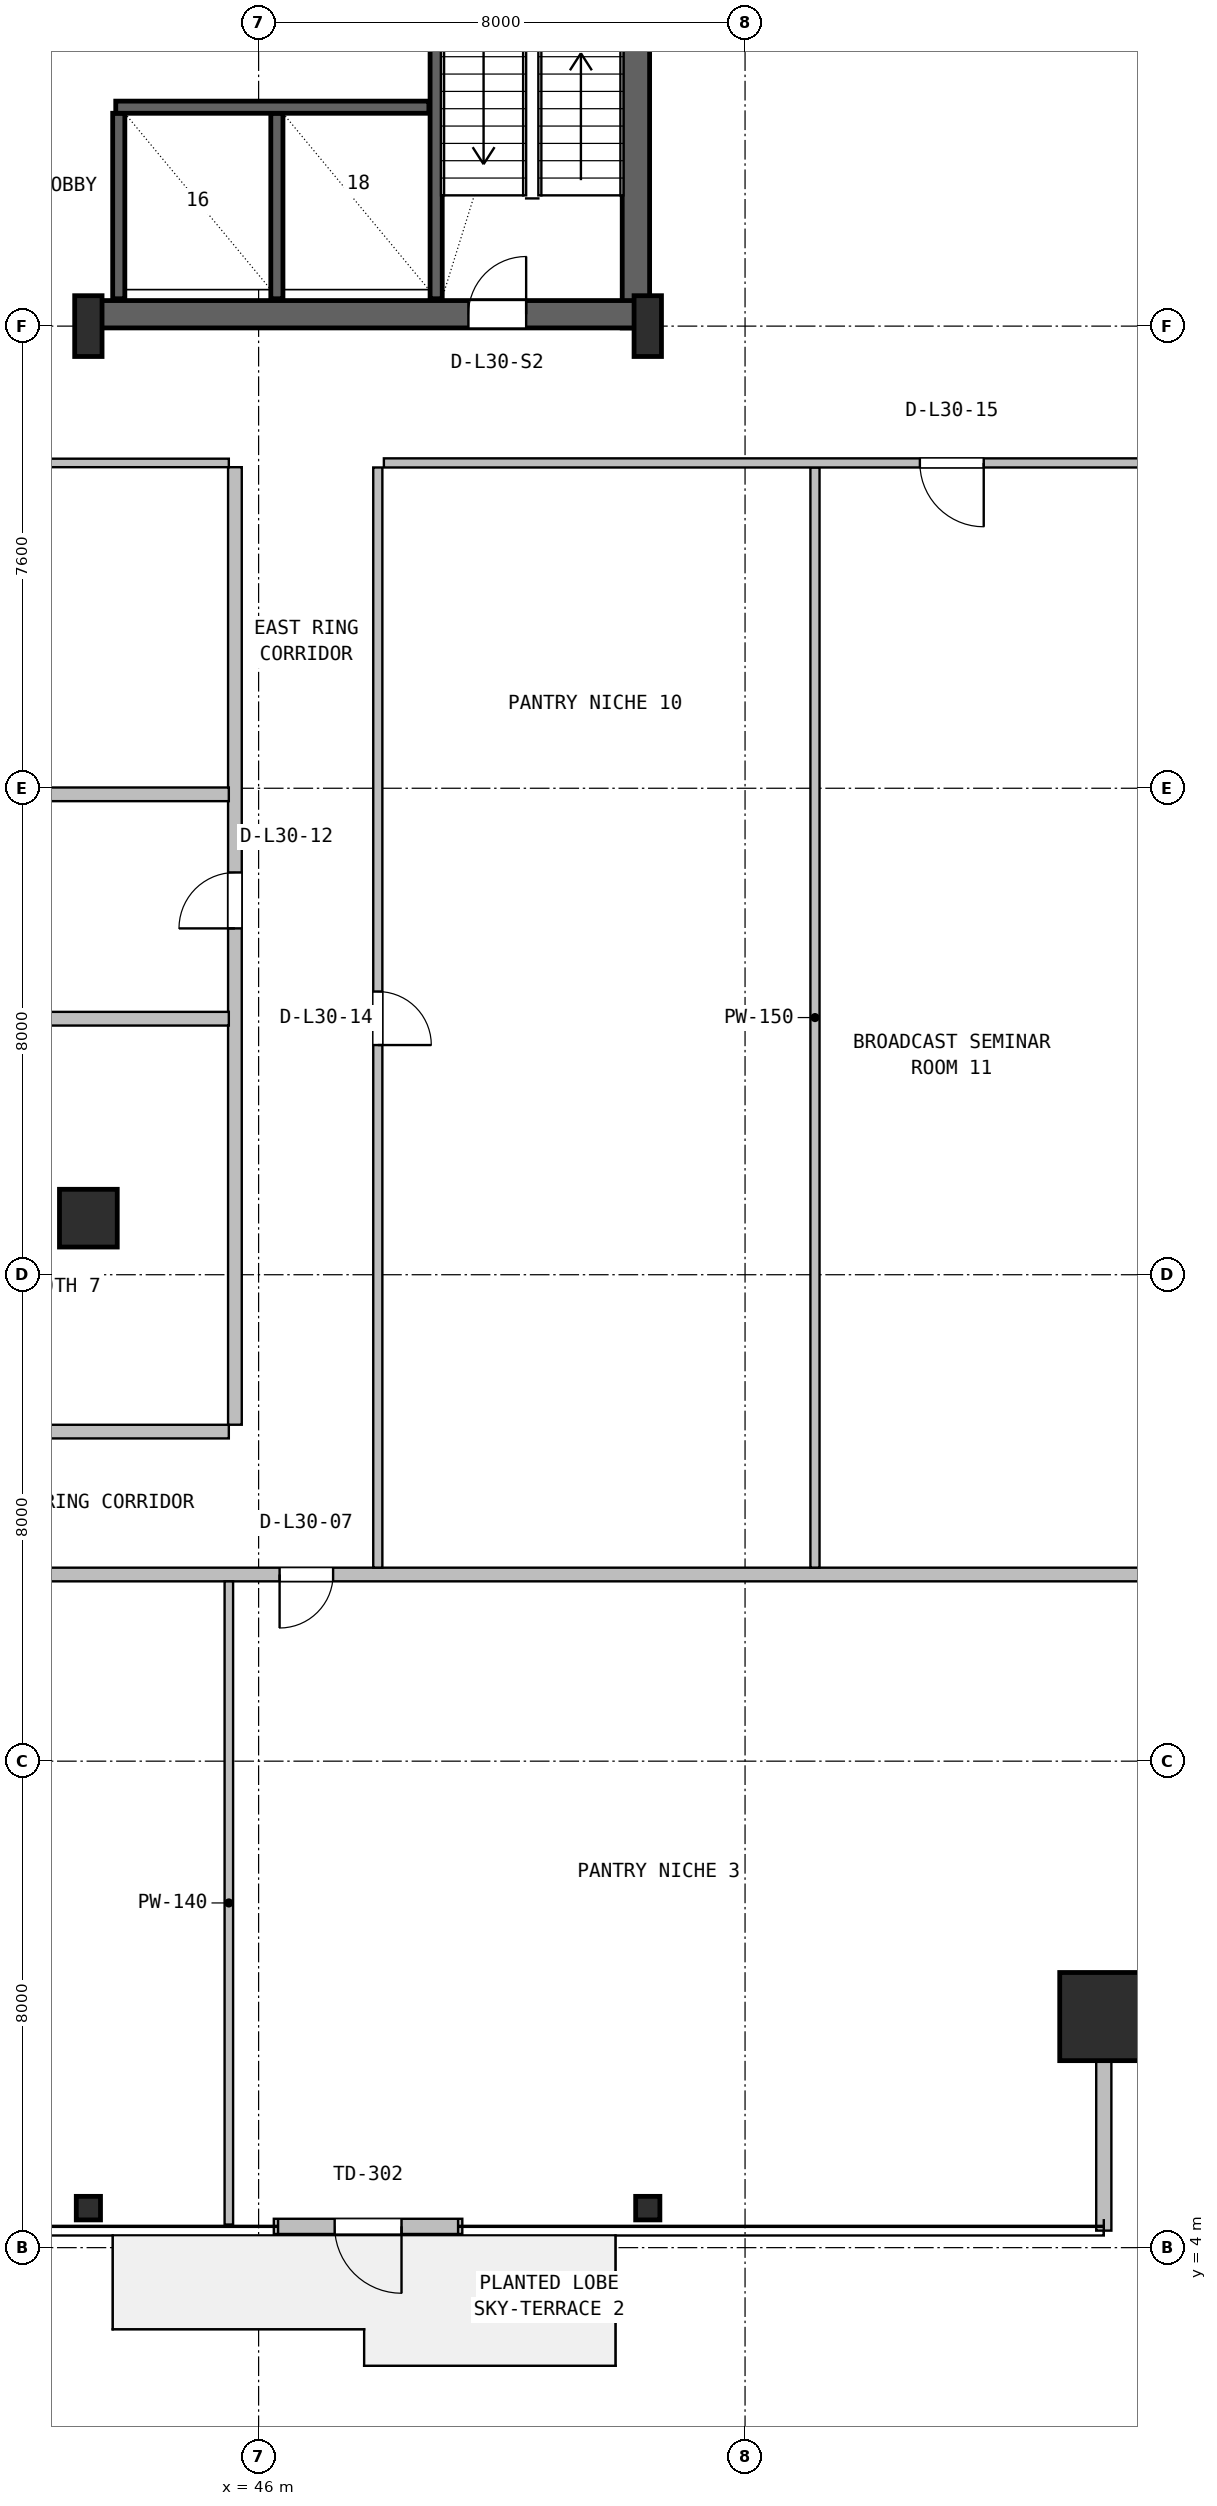
"""IFC4 building model, lengths in metres.
Left out: names, types, materials, properties, quantities, classifications, styles, units other than length and angle.
Written with IfcOpenShell. Run it as: python <this file> out.ifc"""

import sys

from ifc_helpers import new_model, si_unit, direction, frame, frame_2d, origin, origin_2d, place, context, subcontext, project, spatial, rectangle, hollow_rectangle, i_section, extrude, source, transform, mapped, element, fill, save


model = new_model("IFC4")
c1 = context("Model", 3, precision=1e-05, world=origin(), true_north=direction((0.0, 1.0)))
c2 = subcontext(c1, "Body", "Model", "MODEL_VIEW")
j1 = project(units=[si_unit("LENGTHUNIT", "METRE"), si_unit("PLANEANGLEUNIT", "RADIAN")], contexts=[c1])
p1 = place(None, origin())
s1 = spatial("IfcSite", under=j1, at=p1, CompositionType="ELEMENT")
p2 = place(p1, origin())
s2 = spatial("IfcBuilding", under=s1, at=p2, CompositionType="ELEMENT")
p3 = place(p2, frame((0.0, 0.0, 125.8)))
s3 = spatial("IfcBuildingStorey", under=s2, at=p3, CompositionType="ELEMENT", Elevation=125.8)
p4 = place(p3, frame((52.205, 35.57, 0.0), z_axis=(0.0, 0.0, 1.0), x_axis=(0.0, 1.0, 0.0)))
e1 = element("IfcWall", 1, at=p4, inside=s3, PredefinedType="SHEAR", context=c2, shape_type="SweptSolid", body=[
    extrude(rectangle(XDim=11.23, YDim=0.45, at=frame_2d((5.615, 0.0))), origin(), (0.0, 0.0, 1.0), 3.55),
])
p5 = place(p3, frame((43.2, 35.795, 0.0), z_axis=(0.0, 0.0, 1.0), x_axis=(1.0, 0.0, 0.0)))
e2 = element("IfcWall", 2, at=p5, inside=s3, PredefinedType="SHEAR", context=c2, shape_type="SweptSolid", body=[
    extrude(rectangle(XDim=9.23, YDim=0.45, at=frame_2d((4.615, 0.0))), origin(), (0.0, 0.0, 1.0), 3.55),
])
p6 = place(p5, frame((6.25, 0.0, 0.0)))
e3 = element("IfcOpeningElement", 3, at=p6, cuts=e2, PredefinedType="OPENING", context=c2, shape_type="SweptSolid", body=[
    extrude(rectangle(XDim=0.95, YDim=2.1, at=frame_2d((0.475, 1.05))), frame((0.0, 0.235, 0.0), z_axis=(0.0, -1.0, 0.0), x_axis=(1.0, 0.0, 0.0)), (0.0, 0.0, 1.0), 0.47),
])
m1 = source(origin(), c2, "Body", "SweptSolid", [
    extrude(i_section(OverallWidth=0.45, OverallDepth=1.0, WebThickness=0.016, FlangeThickness=0.03, FilletRadius=0.016, at=origin_2d()), origin(), (0.0, 0.0, 1.0), 3.8),
])
for number, where, z_axis, x_axis in (
    (4, (43.2, 35.6, 0.0), (0.0, 0.0, 1.0), (1.0, 0.0, 0.0)),
    (5, (52.4, 35.6, 0.0), (0.0, 0.0, 1.0), (1.0, 0.0, 0.0)),
):
    element("IfcColumn", number, at=place(p3, frame(where, z_axis=z_axis, x_axis=x_axis)), inside=s3, PredefinedType="COLUMN", context=c2, shape_type="MappedRepresentation", body=[
        mapped(m1, transform((0.0, 0.0, 0.0), x_axis=(1.0, 0.0, 0.0), y_axis=(0.0, 1.0, 0.0), z_axis=(0.0, 0.0, 1.0), scale=1.0)),
    ])
m2 = source(origin(), c2, "Body", "SweptSolid", [
    extrude(hollow_rectangle(XDim=1.45, YDim=1.45, WallThickness=0.055, at=origin_2d()), origin(), (0.0, 0.0, 1.0), 3.8),
])
p7 = place(p3, frame((59.9, 7.8, 0.0), z_axis=(0.0, 0.0, 1.0), x_axis=(1.0, 0.0, 0.0)))
e6 = element("IfcColumn", 6, at=p7, inside=s3, PredefinedType="COLUMN", context=c2, shape_type="MappedRepresentation", body=[
    mapped(m2, transform((0.0, 0.0, 0.0), x_axis=(1.0, 0.0, 0.0), y_axis=(0.0, 1.0, 0.0), z_axis=(0.0, 0.0, 1.0), scale=1.0)),
])
m3 = source(origin(), c2, "Body", "SweptSolid", [
    extrude(i_section(OverallWidth=0.398, OverallDepth=0.387, WebThickness=0.021, FlangeThickness=0.033, FilletRadius=0.018, at=origin_2d()), origin(), (0.0, 0.0, 1.0), 3.8),
])
for number, where, z_axis, x_axis in (
    (7, (43.2, 4.65, 0.0), (0.0, 0.0, 1.0), (1.0, 0.0, 0.0)),
    (8, (52.4, 4.65, 0.0), (0.0, 0.0, 1.0), (1.0, 0.0, 0.0)),
):
    element("IfcColumn", number, at=place(p3, frame(where, z_axis=z_axis, x_axis=x_axis)), inside=s3, PredefinedType="COLUMN", context=c2, shape_type="MappedRepresentation", body=[
        mapped(m3, transform((0.0, 0.0, 0.0), x_axis=(1.0, 0.0, 0.0), y_axis=(0.0, 1.0, 0.0), z_axis=(0.0, 0.0, 1.0), scale=1.0)),
    ])
m4 = source(origin(), c2, "Body", "SweptSolid", [
    extrude(rectangle(XDim=0.95, YDim=0.95, at=origin_2d()), origin(), (0.0, 0.0, 1.0), 3.8),
])
p8 = place(p3, frame((43.2, 20.93, 0.0), z_axis=(0.0, 0.0, 1.0), x_axis=(1.0, 0.0, 0.0)))
e9 = element("IfcColumn", 9, at=p8, inside=s3, PredefinedType="COLUMN", context=c2, shape_type="MappedRepresentation", body=[
    mapped(m4, transform((0.0, 0.0, 0.0), x_axis=(1.0, 0.0, 0.0), y_axis=(0.0, 1.0, 0.0), z_axis=(0.0, 0.0, 1.0), scale=1.0)),
])
p9 = place(p3, frame((46.25, 4.35, 0.0), z_axis=(0.0, 0.0, 1.0), x_axis=(1.0, 0.0, 0.0)))
e10 = element("IfcWall", 10, at=p9, inside=s3, PredefinedType="SOLIDWALL", context=c2, shape_type="SweptSolid", body=[
    extrude(rectangle(XDim=3.1, YDim=0.25, at=frame_2d((1.55, 0.0))), origin(), (0.0, 0.0, 1.0), 3.53),
])
p10 = place(p9, frame((1.0, 0.0, 0.0)))
e11 = element("IfcOpeningElement", 11, at=p10, cuts=e10, PredefinedType="OPENING", context=c2, shape_type="SweptSolid", body=[
    extrude(rectangle(XDim=1.1, YDim=2.15, at=frame_2d((0.55, 1.075))), frame((0.0, 0.135, 0.0), z_axis=(0.0, -1.0, 0.0), x_axis=(1.0, 0.0, 0.0)), (0.0, 0.0, 1.0), 0.27),
])
p11 = place(p3, frame((59.9, 4.28, 0.0), z_axis=(0.0, 0.0, 1.0), x_axis=(0.0, 1.0, 0.0)))
e12 = element("IfcWall", 12, at=p11, inside=s3, PredefinedType="SOLIDWALL", context=c2, shape_type="SweptSolid", body=[
    extrude(rectangle(XDim=3.6, YDim=0.25, at=frame_2d((1.8, 0.0))), origin(), (0.0, 0.0, 1.0), 3.108),
])
p12 = place(p3, frame((48.92, 36.05, 0.0), z_axis=(0.0, 0.0, 1.0), x_axis=(0.0, 1.0, 0.0)))
e13 = element("IfcWall", 13, at=p12, inside=s3, PredefinedType="SHEAR", context=c2, shape_type="SweptSolid", body=[
    extrude(rectangle(XDim=10.5, YDim=0.2, at=frame_2d((5.25, 0.0))), origin(), (0.0, 0.0, 1.0), 3.55),
])
for number, where, z_axis, x_axis in (
    (14, (43.7, 36.05, 0.0), (0.0, 0.0, 1.0), (0.0, 1.0, 0.0)),
    (15, (46.3, 36.05, 0.0), (0.0, 0.0, 1.0), (0.0, 1.0, 0.0)),
):
    element("IfcWall", number, at=place(p3, frame(where, z_axis=z_axis, x_axis=x_axis)), inside=s3, PredefinedType="SHEAR", context=c2, shape_type="SweptSolid", body=[
        extrude(rectangle(XDim=3.05, YDim=0.2, at=frame_2d((1.525, 0.0))), origin(), (0.0, 0.0, 1.0), 3.55),
    ])
p13 = place(p3, frame((43.65, 39.2, 0.0), z_axis=(0.0, 0.0, 1.0), x_axis=(1.0, 0.0, 0.0)))
e16 = element("IfcWall", 16, at=p13, inside=s3, PredefinedType="SHEAR", context=c2, shape_type="SweptSolid", body=[
    extrude(rectangle(XDim=5.15, YDim=0.2, at=frame_2d((2.575, 0.0))), origin(), (0.0, 0.0, 1.0), 3.55),
])
p14 = place(p3, frame((4.68, 15.07, 0.0), z_axis=(0.0, 0.0, 1.0), x_axis=(1.0, 0.0, 0.0)))
e17 = element("IfcWall", 17, at=p14, inside=s3, PredefinedType="PARTITIONING", context=c2, shape_type="SweptSolid", body=[
    extrude(rectangle(XDim=58.64, YDim=0.225, at=frame_2d((29.32, 0.0))), origin(), (0.0, 0.0, 1.0), 2.83),
])
p15 = place(p14, frame((22.305, 0.0, 0.0)))
e18 = element("IfcOpeningElement", 18, at=p15, cuts=e17, PredefinedType="OPENING", context=c2, shape_type="SweptSolid", body=[
    extrude(rectangle(XDim=0.92, YDim=2.08, at=frame_2d((0.46, 1.04))), frame((0.0, 0.123, 0.0), z_axis=(0.0, -1.0, 0.0), x_axis=(1.0, 0.0, 0.0)), (0.0, 0.0, 1.0), 0.245),
])
p16 = place(p14, frame((31.935, 0.0, 0.0)))
e19 = element("IfcOpeningElement", 19, at=p16, cuts=e17, PredefinedType="OPENING", context=c2, shape_type="SweptSolid", body=[
    extrude(rectangle(XDim=1.0, YDim=2.1, at=frame_2d((0.5, 1.05))), frame((0.0, 0.123, 0.0), z_axis=(0.0, -1.0, 0.0), x_axis=(1.0, 0.0, 0.0)), (0.0, 0.0, 1.0), 0.245),
])
p17 = place(p14, frame((41.665, 0.0, 0.0)))
e20 = element("IfcOpeningElement", 20, at=p17, cuts=e17, PredefinedType="OPENING", context=c2, shape_type="SweptSolid", body=[
    extrude(rectangle(XDim=0.88, YDim=2.06, at=frame_2d((0.44, 1.03))), frame((0.0, 0.123, 0.0), z_axis=(0.0, -1.0, 0.0), x_axis=(1.0, 0.0, 0.0)), (0.0, 0.0, 1.0), 0.245),
])
p18 = place(p3, frame((45.51, 4.38, 0.0), z_axis=(0.0, 0.0, 1.0), x_axis=(0.0, 1.0, 0.0)))
e21 = element("IfcWall", 21, at=p18, inside=s3, PredefinedType="PARTITIONING", context=c2, shape_type="SweptSolid", body=[
    extrude(rectangle(XDim=10.577, YDim=0.14, at=frame_2d((5.289, 0.0))), origin(), (0.0, 0.0, 1.0), 3.108),
])
p19 = place(p3, frame((28.72, 17.42, 0.0), z_axis=(0.0, 0.0, 1.0), x_axis=(1.0, 0.0, 0.0)))
e22 = element("IfcWall", 22, at=p19, inside=s3, PredefinedType="PARTITIONING", context=c2, shape_type="SweptSolid", body=[
    extrude(rectangle(XDim=16.79, YDim=0.225, at=frame_2d((8.395, 0.0))), origin(), (0.0, 0.0, 1.0), 2.83),
])
p20 = place(p19, frame((7.695, 0.0, 0.0)))
e23 = element("IfcOpeningElement", 23, at=p20, cuts=e22, PredefinedType="OPENING", context=c2, shape_type="SweptSolid", body=[
    extrude(rectangle(XDim=1.4, YDim=2.12, at=frame_2d((0.7, 1.06))), frame((0.0, 0.123, 0.0), z_axis=(0.0, -1.0, 0.0), x_axis=(1.0, 0.0, 0.0)), (0.0, 0.0, 1.0), 0.245),
])
p21 = place(p3, frame((45.61, 17.533, 0.0), z_axis=(0.0, 0.0, 1.0), x_axis=(0.0, 1.0, 0.0)))
e24 = element("IfcWall", 24, at=p21, inside=s3, PredefinedType="PARTITIONING", context=c2, shape_type="SweptSolid", body=[
    extrude(rectangle(XDim=15.747, YDim=0.225, at=frame_2d((7.874, 0.0))), origin(), (0.0, 0.0, 1.0), 3.222),
])
p22 = place(p21, frame((8.162, 0.0, 0.0)))
e25 = element("IfcOpeningElement", 25, at=p22, cuts=e24, PredefinedType="OPENING", context=c2, shape_type="SweptSolid", body=[
    extrude(rectangle(XDim=0.92, YDim=2.08, at=frame_2d((0.46, 1.04))), frame((0.0, 0.123, 0.0), z_axis=(0.0, -1.0, 0.0), x_axis=(1.0, 0.0, 0.0)), (0.0, 0.0, 1.0), 0.245),
])
for number, where, z_axis, x_axis in (
    (26, (28.72, 24.21, 0.0), (0.0, 0.0, 1.0), (1.0, 0.0, 0.0)),
    (27, (28.72, 27.9, 0.0), (0.0, 0.0, 1.0), (1.0, 0.0, 0.0)),
):
    element("IfcWall", number, at=place(p3, frame(where, z_axis=z_axis, x_axis=x_axis)), inside=s3, PredefinedType="PARTITIONING", context=c2, shape_type="SweptSolid", body=[
        extrude(rectangle(XDim=16.79, YDim=0.225, at=frame_2d((8.395, 0.0))), origin(), (0.0, 0.0, 1.0), 2.83),
    ])
p23 = place(p3, frame((28.72, 33.35, 0.0), z_axis=(0.0, 0.0, 1.0), x_axis=(1.0, 0.0, 0.0)))
e28 = element("IfcWall", 28, at=p23, inside=s3, PredefinedType="PARTITIONING", context=c2, shape_type="SweptSolid", body=[
    extrude(rectangle(XDim=16.79, YDim=0.14, at=frame_2d((8.395, 0.0))), origin(), (0.0, 0.0, 1.0), 2.83),
])
p24 = place(p23, frame((7.895, 0.0, 0.0)))
e29 = element("IfcOpeningElement", 29, at=p24, cuts=e28, PredefinedType="OPENING", context=c2, shape_type="SweptSolid", body=[
    extrude(rectangle(XDim=1.0, YDim=2.1, at=frame_2d((0.5, 1.05))), frame((0.0, 0.08, 0.0), z_axis=(0.0, -1.0, 0.0), x_axis=(1.0, 0.0, 0.0)), (0.0, 0.0, 1.0), 0.16),
])
p25 = place(p3, frame((55.15, 15.183, 0.0), z_axis=(0.0, 0.0, 1.0), x_axis=(0.0, 1.0, 0.0)))
e30 = element("IfcWall", 30, at=p25, inside=s3, PredefinedType="PARTITIONING", context=c2, shape_type="SweptSolid", body=[
    extrude(rectangle(XDim=18.092, YDim=0.15, at=frame_2d((9.046, 0.0))), origin(), (0.0, 0.0, 1.0), 3.222),
])
p26 = place(p3, frame((48.06, 33.35, 0.0), z_axis=(0.0, 0.0, 1.0), x_axis=(1.0, 0.0, 0.0)))
e31 = element("IfcWall", 31, at=p26, inside=s3, PredefinedType="PARTITIONING", context=c2, shape_type="SweptSolid", body=[
    extrude(rectangle(XDim=15.26, YDim=0.15, at=frame_2d((7.63, 0.0))), origin(), (0.0, 0.0, 1.0), 3.108),
])
p27 = place(p26, frame((8.815, 0.0, 0.0)))
e32 = element("IfcOpeningElement", 32, at=p27, cuts=e31, PredefinedType="OPENING", context=c2, shape_type="SweptSolid", body=[
    extrude(rectangle(XDim=1.05, YDim=2.1, at=frame_2d((0.525, 1.05))), frame((0.0, 0.085, 0.0), z_axis=(0.0, -1.0, 0.0), x_axis=(1.0, 0.0, 0.0)), (0.0, 0.0, 1.0), 0.17),
])
p28 = place(p3, frame((47.96, 15.183, 0.0), z_axis=(0.0, 0.0, 1.0), x_axis=(0.0, 1.0, 0.0)))
e33 = element("IfcWall", 33, at=p28, inside=s3, PredefinedType="PARTITIONING", context=c2, shape_type="SweptSolid", body=[
    extrude(rectangle(XDim=18.092, YDim=0.15, at=frame_2d((9.046, 0.0))), origin(), (0.0, 0.0, 1.0), 3.222),
])
p29 = place(p28, frame((8.594, 0.0, 0.0)))
e34 = element("IfcOpeningElement", 34, at=p29, cuts=e33, PredefinedType="OPENING", context=c2, shape_type="SweptSolid", body=[
    extrude(rectangle(XDim=0.88, YDim=2.06, at=frame_2d((0.44, 1.03))), frame((0.0, 0.085, 0.0), z_axis=(0.0, -1.0, 0.0), x_axis=(1.0, 0.0, 0.0)), (0.0, 0.0, 1.0), 0.17),
])
m5 = source(origin(), c2, "Body", "SweptSolid", [
    extrude(rectangle(XDim=1.1, YDim=2.15, at=frame_2d((0.55, 1.075))), frame((0.0, 0.025, 0.0), z_axis=(0.0, -1.0, 0.0), x_axis=(1.0, 0.0, 0.0)), (0.0, 0.0, 1.0), 0.05),
])
p30 = place(p10, frame((1.1, 0.0, 0.0), z_axis=(0.0, 0.0, 1.0), x_axis=(-1.0, 0.0, 0.0)))
e35 = element("IfcDoor", 35, at=p30, inside=s3, OperationType="SINGLE_SWING_RIGHT", PredefinedType="DOOR", context=c2, shape_type="MappedRepresentation", body=[
    mapped(m5, transform((0.0, 0.0, 0.0), x_axis=(1.0, 0.0, 0.0), y_axis=(0.0, 1.0, 0.0), z_axis=(0.0, 0.0, 1.0), scale=1.0)),
])
fill(e11, e35)
m6 = source(origin(), c2, "Body", "SweptSolid", [
    extrude(rectangle(XDim=0.95, YDim=2.1, at=frame_2d((0.475, 1.05))), frame((0.0, 0.025, 0.0), z_axis=(0.0, -1.0, 0.0), x_axis=(1.0, 0.0, 0.0)), (0.0, 0.0, 1.0), 0.05),
])
p31 = place(p6, origin())
e36 = element("IfcDoor", 36, at=p31, inside=s3, OperationType="SINGLE_SWING_RIGHT", PredefinedType="DOOR", context=c2, shape_type="MappedRepresentation", body=[
    mapped(m6, transform((0.0, 0.0, 0.0), x_axis=(1.0, 0.0, 0.0), y_axis=(0.0, 1.0, 0.0), z_axis=(0.0, 0.0, 1.0), scale=1.0)),
])
fill(e3, e36)
m7 = source(origin(), c2, "Body", "SweptSolid", [
    extrude(rectangle(XDim=0.88, YDim=2.06, at=frame_2d((0.44, 1.03))), frame((0.0, 0.025, 0.0), z_axis=(0.0, -1.0, 0.0), x_axis=(1.0, 0.0, 0.0)), (0.0, 0.0, 1.0), 0.05),
])
p32 = place(p17, frame((0.88, 0.0, 0.0), z_axis=(0.0, 0.0, 1.0), x_axis=(-1.0, 0.0, 0.0)))
e37 = element("IfcDoor", 37, at=p32, inside=s3, OperationType="SINGLE_SWING_LEFT", PredefinedType="DOOR", context=c2, shape_type="MappedRepresentation", body=[
    mapped(m7, transform((0.0, 0.0, 0.0), x_axis=(1.0, 0.0, 0.0), y_axis=(0.0, 1.0, 0.0), z_axis=(0.0, 0.0, 1.0), scale=1.0)),
])
fill(e20, e37)
m8 = source(origin(), c2, "Body", "SweptSolid", [
    extrude(rectangle(XDim=0.92, YDim=2.08, at=frame_2d((0.46, 1.04))), frame((0.0, 0.025, 0.0), z_axis=(0.0, -1.0, 0.0), x_axis=(1.0, 0.0, 0.0)), (0.0, 0.0, 1.0), 0.05),
])
p33 = place(p22, origin())
e38 = element("IfcDoor", 38, at=p33, inside=s3, OperationType="SINGLE_SWING_LEFT", PredefinedType="DOOR", context=c2, shape_type="MappedRepresentation", body=[
    mapped(m8, transform((0.0, 0.0, 0.0), x_axis=(1.0, 0.0, 0.0), y_axis=(0.0, 1.0, 0.0), z_axis=(0.0, 0.0, 1.0), scale=1.0)),
])
fill(e25, e38)
p34 = place(p29, frame((0.88, 0.0, 0.0), z_axis=(0.0, 0.0, 1.0), x_axis=(-1.0, 0.0, 0.0)))
e39 = element("IfcDoor", 39, at=p34, inside=s3, OperationType="SINGLE_SWING_LEFT", PredefinedType="DOOR", context=c2, shape_type="MappedRepresentation", body=[
    mapped(m7, transform((0.0, 0.0, 0.0), x_axis=(1.0, 0.0, 0.0), y_axis=(0.0, 1.0, 0.0), z_axis=(0.0, 0.0, 1.0), scale=1.0)),
])
fill(e34, e39)
m9 = source(origin(), c2, "Body", "SweptSolid", [
    extrude(rectangle(XDim=1.05, YDim=2.1, at=frame_2d((0.525, 1.05))), frame((0.0, 0.025, 0.0), z_axis=(0.0, -1.0, 0.0), x_axis=(1.0, 0.0, 0.0)), (0.0, 0.0, 1.0), 0.05),
])
p35 = place(p27, frame((1.05, 0.0, 0.0), z_axis=(0.0, 0.0, 1.0), x_axis=(-1.0, 0.0, 0.0)))
e40 = element("IfcDoor", 40, at=p35, inside=s3, OperationType="SINGLE_SWING_RIGHT", PredefinedType="DOOR", context=c2, shape_type="MappedRepresentation", body=[
    mapped(m9, transform((0.0, 0.0, 0.0), x_axis=(1.0, 0.0, 0.0), y_axis=(0.0, 1.0, 0.0), z_axis=(0.0, 0.0, 1.0), scale=1.0)),
])
fill(e32, e40)
save(model, sys.argv[1])
